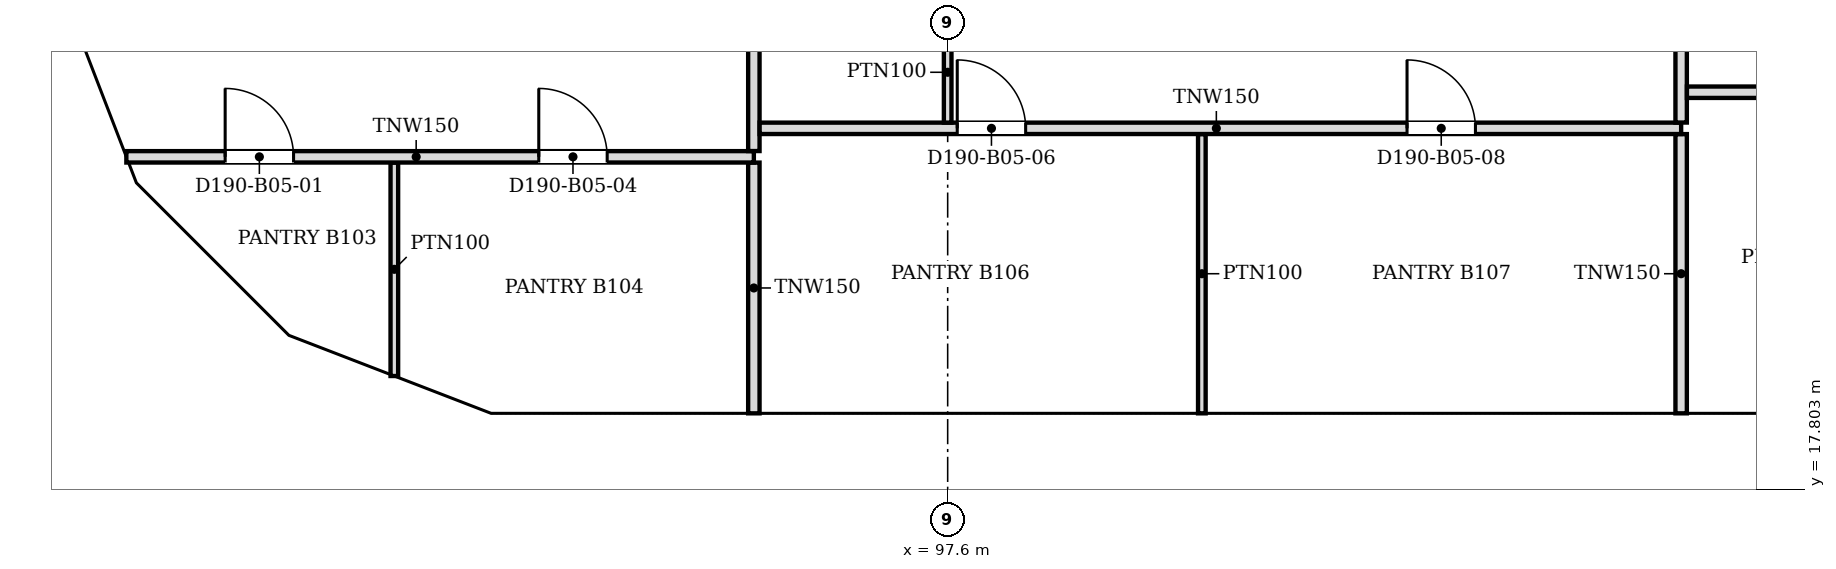
"""IFC4 building model, lengths in metres.
Left out: names, types, materials, properties, quantities, classifications, styles, units other than length and angle.
Written with IfcOpenShell. Run it as: python <this file> out.ifc"""

import sys

from ifc_helpers import new_model, si_unit, direction, frame, frame_2d, origin, place, context, subcontext, project, spatial, polyline, rectangle, outline, extrude, faceted_brep, source, transform, mapped, element, fill, save


model = new_model("IFC4")
c1 = context("Model", 3, precision=1e-05, world=origin(), true_north=direction((0.0, 1.0)))
c2 = subcontext(c1, "Body", "Model", "MODEL_VIEW")
j1 = project(units=[si_unit("LENGTHUNIT", "METRE"), si_unit("PLANEANGLEUNIT", "RADIAN")], contexts=[c1])
p1 = place(None, origin())
s1 = spatial("IfcSite", under=j1, at=p1, CompositionType="ELEMENT")
p2 = place(p1, origin())
s2 = spatial("IfcBuilding", under=s1, at=p2, CompositionType="ELEMENT")
p3 = place(p2, frame((0.0, 0.0, 52.4)))
s3 = spatial("IfcBuildingStorey", under=s2, at=p3, CompositionType="ELEMENT", Elevation=52.4)
m1 = source(origin(), c2, "Body", "Brep", [
    faceted_brep([(3.003, -0.25, 0.0), (6.053, -0.25, 3.8), (3.003, -0.25, 7.6), (0.0, -0.25, 3.8), (0.047, 0.25, 3.859), (3.003, 0.25, 7.6), (6.053, 0.25, 3.8), (3.003, 0.25, 0.0), (0.047, 0.25, 3.741), (0.0, 0.0, 3.8)], [[[0, 1, 2, 3]], [[4, 5, 6, 7, 8]], [[7, 6, 1, 0]], [[6, 5, 2, 1]], [[5, 4, 9, 3, 2]], [[8, 7, 0, 3, 9]], [[8, 9, 4]]]),
])
p4 = place(p3, frame((91.547, 18.55, -3.8), z_axis=(0.0, 0.0, 1.0), x_axis=(1.0, 0.0, 0.0)))
e1 = element("IfcWall", 1, at=p4, inside=s3, PredefinedType="SOLIDWALL", context=c2, shape_type="MappedRepresentation", body=[
    mapped(m1, transform((0.0, 0.0, 0.0), scale=1.0)),
])
m2 = source(origin(), c2, "Body", "SweptSolid", [
    extrude(outline(polyline([(3.005, 0.401), (5.733, 3.8), (3.005, 7.199), (0.319, 3.8), (3.005, 0.401)])), frame((0.0, 0.26, 0.0), z_axis=(0.0, -1.0, 0.0), x_axis=(1.0, 0.0, 0.0)), (0.0, 0.0, 1.0), 0.52),
])
p5 = place(p4, origin())
e2 = element("IfcOpeningElement", 2, at=p5, cuts=e1, PredefinedType="OPENING", context=c2, shape_type="MappedRepresentation", body=[
    mapped(m2, transform((0.0, 0.0, 0.0), scale=1.0)),
])
m3 = source(origin(), c2, "Body", "Brep", [
    faceted_brep([(3.05, -0.25, 0.0), (6.1, -0.25, 3.8), (6.1, -0.25, 3.8), (3.05, -0.25, 7.6), (0.0, -0.25, 3.8), (0.0, 0.25, 3.8), (3.05, 0.25, 7.6), (6.1, 0.25, 3.8), (6.1, 0.25, 3.8), (3.05, 0.25, 0.0)], [[[0, 1, 2, 3, 4]], [[5, 6, 7, 8, 9]], [[9, 8, 1, 0]], [[7, 6, 3, 2]], [[6, 5, 4, 3]], [[5, 9, 0, 4]], [[1, 8, 7, 2]]]),
])
p6 = place(p3, frame((97.6, 18.55, -3.8), z_axis=(0.0, 0.0, 1.0), x_axis=(1.0, 0.0, 0.0)))
e3 = element("IfcWall", 3, at=p6, inside=s3, PredefinedType="SOLIDWALL", context=c2, shape_type="MappedRepresentation", body=[
    mapped(m3, transform((0.0, 0.0, 0.0), scale=1.0)),
])
m4 = source(origin(), c2, "Body", "SweptSolid", [
    extrude(outline(polyline([(3.05, 0.399), (5.78, 3.8), (3.05, 7.2), (0.321, 3.8), (3.05, 0.399)])), frame((0.0, 0.26, 0.0), z_axis=(0.0, -1.0, 0.0), x_axis=(1.0, 0.0, 0.0)), (0.0, 0.0, 1.0), 0.52),
])
p7 = place(p6, origin())
e4 = element("IfcOpeningElement", 4, at=p7, cuts=e3, PredefinedType="OPENING", context=c2, shape_type="MappedRepresentation", body=[
    mapped(m4, transform((0.0, 0.0, 0.0), scale=1.0)),
])
m5 = source(origin(), c2, "Body", "SweptSolid", [
    extrude(outline(polyline([(3.05, 0.0), (6.1, 3.8), (3.05, 7.6), (0.0, 3.8), (3.05, 0.0)])), frame((0.0, 0.25, 0.0), z_axis=(0.0, -1.0, 0.0), x_axis=(1.0, 0.0, 0.0)), (0.0, 0.0, 1.0), 0.5),
])
p8 = place(p3, frame((103.7, 18.55, -3.8), z_axis=(0.0, 0.0, 1.0), x_axis=(1.0, 0.0, 0.0)))
e5 = element("IfcWall", 5, at=p8, inside=s3, PredefinedType="SOLIDWALL", context=c2, shape_type="MappedRepresentation", body=[
    mapped(m5, transform((0.0, 0.0, 0.0), scale=1.0)),
])
p9 = place(p8, origin())
e6 = element("IfcOpeningElement", 6, at=p9, cuts=e5, PredefinedType="OPENING", context=c2, shape_type="MappedRepresentation", body=[
    mapped(m4, transform((0.0, 0.0, 0.0), scale=1.0)),
])
m6 = source(origin(), c2, "Body", "Brep", [
    faceted_brep([(0.047, -0.25, 0.0), (2.997, -0.25, 3.8), (0.047, -0.25, 7.6), (0.0, -0.25, 7.541), (0.0, -0.25, 0.059), (0.093, 0.25, 7.54), (2.944, 0.25, 3.868), (2.944, 0.25, 3.732), (0.093, 0.25, 0.06), (2.997, 0.0, 3.8), (0.047, 0.0, 0.0), (0.047, 0.0, 7.6)], [[[0, 1, 2, 3, 4]], [[5, 6, 7, 8]], [[8, 7, 9, 1, 0, 10]], [[6, 5, 11, 2, 1, 9]], [[3, 2, 11]], [[10, 0, 4]], [[8, 10, 4, 3, 11, 5]], [[9, 7, 6]]]),
])
p10 = place(p3, frame((85.633, 24.49, -3.8), z_axis=(0.0, 0.0, 1.0), x_axis=(0.359901446078, -0.932990326376, 0.0)))
e7 = element("IfcWall", 7, at=p10, inside=s3, PredefinedType="SOLIDWALL", context=c2, shape_type="MappedRepresentation", body=[
    mapped(m6, transform((0.0, 0.0, 0.0), scale=1.0)),
])
m7 = source(origin(), c2, "Body", "SweptSolid", [
    extrude(outline(polyline([(0.247, 0.665), (2.681, 3.8), (0.247, 6.935), (0.247, 0.665)])), frame((0.0, 0.26, 0.0), z_axis=(0.0, -1.0, 0.0), x_axis=(1.0, 0.0, 0.0)), (0.0, 0.0, 1.0), 0.52),
])
p11 = place(p10, origin())
e8 = element("IfcOpeningElement", 8, at=p11, cuts=e7, PredefinedType="OPENING", context=c2, shape_type="MappedRepresentation", body=[
    mapped(m7, transform((0.0, 0.0, 0.0), scale=1.0)),
])
m8 = source(origin(), c2, "Body", "Brep", [
    faceted_brep([(2.944, -0.25, 0.0), (2.997, -0.25, 0.068), (2.997, -0.25, 7.532), (2.944, -0.25, 7.6), (0.0, -0.25, 3.8), (0.053, 0.25, 3.868), (2.891, 0.25, 7.532), (2.891, 0.25, 0.068), (0.053, 0.25, 3.731), (2.944, 0.0, 0.0), (2.944, 0.0, 7.6), (0.0, 0.0, 3.8)], [[[0, 1, 2, 3, 4]], [[5, 6, 7, 8]], [[1, 0, 9]], [[10, 3, 2]], [[6, 5, 11, 4, 3, 10]], [[8, 7, 9, 0, 4, 11]], [[8, 11, 5]], [[1, 9, 7, 6, 10, 2]]]),
])
p12 = place(p3, frame((86.712, 21.694, -3.8), z_axis=(0.0, 0.0, 1.0), x_axis=(0.707066050402, -0.707147509625, 0.0)))
e9 = element("IfcWall", 9, at=p12, inside=s3, PredefinedType="SOLIDWALL", context=c2, shape_type="MappedRepresentation", body=[
    mapped(m8, transform((0.0, 0.0, 0.0), scale=1.0)),
])
m9 = source(origin(), c2, "Body", "SweptSolid", [
    extrude(outline(polyline([(2.744, 6.934), (0.316, 3.8), (2.744, 0.666), (2.744, 6.934)])), frame((0.0, 0.26, 0.0), z_axis=(0.0, -1.0, 0.0), x_axis=(1.0, 0.0, 0.0)), (0.0, 0.0, 1.0), 0.52),
])
p13 = place(p12, origin())
e10 = element("IfcOpeningElement", 10, at=p13, cuts=e9, PredefinedType="OPENING", context=c2, shape_type="MappedRepresentation", body=[
    mapped(m9, transform((0.0, 0.0, 0.0), scale=1.0)),
])
m10 = source(origin(), c2, "Body", "Brep", [
    faceted_brep([(0.053, -0.25, 0.0), (3.003, -0.25, 3.8), (0.053, -0.25, 7.6), (0.0, -0.25, 7.531), (0.0, -0.25, 0.068), (0.106, 0.25, 7.532), (2.957, 0.25, 3.86), (2.957, 0.25, 3.74), (0.106, 0.25, 0.068), (3.003, 0.0, 3.8), (0.053, 0.0, 0.0), (0.053, 0.0, 7.6)], [[[0, 1, 2, 3, 4]], [[5, 6, 7, 8]], [[8, 7, 9, 1, 0, 10]], [[6, 5, 11, 2, 1, 9]], [[3, 2, 11]], [[10, 0, 4]], [[8, 10, 4, 3, 11, 5]], [[9, 7, 6]]]),
])
p14 = place(p3, frame((88.744, 19.631, -3.8), z_axis=(0.0, 0.0, 1.0), x_axis=(0.932997369089, -0.359883188373, 0.0)))
e11 = element("IfcWall", 11, at=p14, inside=s3, PredefinedType="SOLIDWALL", context=c2, shape_type="MappedRepresentation", body=[
    mapped(m10, transform((0.0, 0.0, 0.0), scale=1.0)),
])
m11 = source(origin(), c2, "Body", "SweptSolid", [
    extrude(outline(polyline([(0.253, 0.665), (2.687, 3.8), (0.253, 6.935), (0.253, 0.665)])), frame((0.0, 0.26, 0.0), z_axis=(0.0, -1.0, 0.0), x_axis=(1.0, 0.0, 0.0)), (0.0, 0.0, 1.0), 0.52),
])
p15 = place(p14, origin())
e12 = element("IfcOpeningElement", 12, at=p15, cuts=e11, PredefinedType="OPENING", context=c2, shape_type="MappedRepresentation", body=[
    mapped(m11, transform((0.0, 0.0, 0.0), scale=1.0)),
])
p16 = place(p2, frame((0.0, 0.0, 56.2)))
s4 = spatial("IfcBuildingStorey", under=s2, at=p16, CompositionType="ELEMENT", Elevation=56.2)
m12 = source(origin(), c2, "Body", "Brep", [
    faceted_brep([(0.047, -0.25, 0.0), (3.05, -0.25, 3.8), (0.047, -0.25, 7.6), (0.0, -0.25, 7.54), (0.0, -0.25, 0.06), (0.093, 0.25, 7.541), (3.05, 0.25, 3.8), (0.093, 0.25, 0.059), (0.047, 0.0, 0.0), (0.047, 0.0, 7.6)], [[[0, 1, 2, 3, 4]], [[5, 6, 7]], [[7, 6, 1, 0, 8]], [[6, 5, 9, 2, 1]], [[3, 2, 9]], [[8, 0, 4]], [[7, 8, 4, 3, 9, 5]]]),
])
p17 = place(p16, frame((91.5, 18.55, -3.8), z_axis=(0.0, 0.0, 1.0), x_axis=(1.0, 0.0, 0.0)))
e13 = element("IfcWall", 13, at=p17, inside=s4, PredefinedType="SOLIDWALL", context=c2, shape_type="MappedRepresentation", body=[
    mapped(m12, transform((0.0, 0.0, 0.0), scale=1.0)),
])
m13 = source(origin(), c2, "Body", "SweptSolid", [
    extrude(outline(polyline([(0.247, 0.656), (2.731, 3.8), (0.247, 6.944), (0.247, 0.656)])), frame((0.0, 0.26, 0.0), z_axis=(0.0, -1.0, 0.0), x_axis=(1.0, 0.0, 0.0)), (0.0, 0.0, 1.0), 0.52),
])
p18 = place(p17, origin())
e14 = element("IfcOpeningElement", 14, at=p18, cuts=e13, PredefinedType="OPENING", context=c2, shape_type="MappedRepresentation", body=[
    mapped(m13, transform((0.0, 0.0, 0.0), scale=1.0)),
])
m14 = source(origin(), c2, "Body", "Brep", [
    faceted_brep([(2.95, -0.25, 0.0), (2.997, -0.25, 0.059), (2.997, -0.25, 7.541), (2.95, -0.25, 7.6), (0.0, -0.25, 3.8), (0.053, 0.25, 3.868), (2.904, 0.25, 7.54), (2.904, 0.25, 0.06), (0.053, 0.25, 3.732), (2.95, 0.0, 0.0), (2.95, 0.0, 7.6), (0.0, 0.0, 3.8)], [[[0, 1, 2, 3, 4]], [[5, 6, 7, 8]], [[1, 0, 9]], [[10, 3, 2]], [[6, 5, 11, 4, 3, 10]], [[8, 7, 9, 0, 4, 11]], [[8, 11, 5]], [[1, 9, 7, 6, 10, 2]]]),
])
p19 = place(p16, frame((88.794, 19.612, -3.8), z_axis=(0.0, 0.0, 1.0), x_axis=(0.933000876937, -0.359874094142, 0.0)))
e15 = element("IfcWall", 15, at=p19, inside=s4, PredefinedType="SOLIDWALL", context=c2, shape_type="MappedRepresentation", body=[
    mapped(m14, transform((0.0, 0.0, 0.0), scale=1.0)),
])
m15 = source(origin(), c2, "Body", "SweptSolid", [
    extrude(outline(polyline([(2.75, 6.935), (0.316, 3.8), (2.75, 0.665), (2.75, 6.935)])), frame((0.0, 0.26, 0.0), z_axis=(0.0, -1.0, 0.0), x_axis=(1.0, 0.0, 0.0)), (0.0, 0.0, 1.0), 0.52),
])
p20 = place(p19, origin())
e16 = element("IfcOpeningElement", 16, at=p20, cuts=e15, PredefinedType="OPENING", context=c2, shape_type="MappedRepresentation", body=[
    mapped(m15, transform((0.0, 0.0, 0.0), scale=1.0)),
])
m16 = source(origin(), c2, "Body", "Brep", [
    faceted_brep([(3.05, -0.25, 0.0), (6.1, -0.25, 3.8), (6.1, -0.25, 3.8), (3.05, -0.25, 7.6), (0.0, -0.25, 3.8), (0.0, 0.25, 3.8), (3.05, 0.25, 7.6), (6.1, 0.25, 3.8), (6.1, 0.25, 3.8), (3.05, 0.25, 0.0)], [[[0, 1, 2, 3, 4]], [[5, 6, 7, 8, 9]], [[9, 8, 1, 0]], [[7, 6, 3, 2]], [[6, 5, 4, 3]], [[5, 9, 0, 4]], [[1, 8, 7, 2]]]),
])
p21 = place(p16, frame((94.55, 18.55, -3.8), z_axis=(0.0, 0.0, 1.0), x_axis=(1.0, 0.0, 0.0)))
e17 = element("IfcWall", 17, at=p21, inside=s4, PredefinedType="SOLIDWALL", context=c2, shape_type="MappedRepresentation", body=[
    mapped(m16, transform((0.0, 0.0, 0.0), scale=1.0)),
])
m17 = source(origin(), c2, "Body", "SweptSolid", [
    extrude(outline(polyline([(3.05, 0.399), (5.78, 3.8), (3.05, 7.201), (0.321, 3.8), (3.05, 0.399)])), frame((0.0, 0.26, 0.0), z_axis=(0.0, -1.0, 0.0), x_axis=(1.0, 0.0, 0.0)), (0.0, 0.0, 1.0), 0.52),
])
p22 = place(p21, origin())
e18 = element("IfcOpeningElement", 18, at=p22, cuts=e17, PredefinedType="OPENING", context=c2, shape_type="MappedRepresentation", body=[
    mapped(m17, transform((0.0, 0.0, 0.0), scale=1.0)),
])
m18 = source(origin(), c2, "Body", "SweptSolid", [
    extrude(outline(polyline([(3.05, 0.0), (6.1, 3.8), (3.05, 7.6), (0.0, 3.8), (3.05, 0.0)])), frame((0.0, 0.25, 0.0), z_axis=(0.0, -1.0, 0.0), x_axis=(1.0, 0.0, 0.0)), (0.0, 0.0, 1.0), 0.5),
])
p23 = place(p16, frame((100.65, 18.55, -3.8), z_axis=(0.0, 0.0, 1.0), x_axis=(1.0, 0.0, 0.0)))
e19 = element("IfcWall", 19, at=p23, inside=s4, PredefinedType="SOLIDWALL", context=c2, shape_type="MappedRepresentation", body=[
    mapped(m18, transform((0.0, 0.0, 0.0), scale=1.0)),
])
p24 = place(p23, origin())
e20 = element("IfcOpeningElement", 20, at=p24, cuts=e19, PredefinedType="OPENING", context=c2, shape_type="MappedRepresentation", body=[
    mapped(m17, transform((0.0, 0.0, 0.0), scale=1.0)),
])
p25 = place(p16, frame((106.75, 18.55, -3.8), z_axis=(0.0, 0.0, 1.0), x_axis=(1.0, 0.0, 0.0)))
e21 = element("IfcWall", 21, at=p25, inside=s4, PredefinedType="SOLIDWALL", context=c2, shape_type="MappedRepresentation", body=[
    mapped(m18, transform((0.0, 0.0, 0.0), scale=1.0)),
])
p26 = place(p25, origin())
e22 = element("IfcOpeningElement", 22, at=p26, cuts=e21, PredefinedType="OPENING", context=c2, shape_type="MappedRepresentation", body=[
    mapped(m17, transform((0.0, 0.0, 0.0), scale=1.0)),
])
m19 = source(origin(), c2, "Body", "Brep", [
    faceted_brep([(2.95, -0.25, 0.0), (3.003, -0.25, 0.068), (3.003, -0.25, 7.532), (2.95, -0.25, 7.6), (0.0, -0.25, 3.8), (0.047, 0.25, 3.86), (2.898, 0.25, 7.532), (2.898, 0.25, 0.068), (0.047, 0.25, 3.74), (2.95, 0.0, 0.0), (2.95, 0.0, 7.6), (0.0, 0.0, 3.8)], [[[0, 1, 2, 3, 4]], [[5, 6, 7, 8]], [[1, 0, 9]], [[10, 3, 2]], [[6, 5, 11, 4, 3, 10]], [[8, 7, 9, 0, 4, 11]], [[8, 11, 5]], [[1, 9, 7, 6, 10, 2]]]),
])
p27 = place(p16, frame((85.65, 24.447, -3.8), z_axis=(0.0, 0.0, 1.0), x_axis=(0.35992665181, -0.932980602862, 0.0)))
e23 = element("IfcWall", 23, at=p27, inside=s4, PredefinedType="SOLIDWALL", context=c2, shape_type="MappedRepresentation", body=[
    mapped(m19, transform((0.0, 0.0, 0.0), scale=1.0)),
])
p28 = place(p27, origin())
e24 = element("IfcOpeningElement", 24, at=p28, cuts=e23, PredefinedType="OPENING", context=c2, shape_type="MappedRepresentation", body=[
    mapped(m15, transform((0.0, 0.0, 0.0), scale=1.0)),
])
m20 = source(origin(), c2, "Body", "Brep", [
    faceted_brep([(0.053, -0.25, 0.0), (2.997, -0.25, 3.8), (0.053, -0.25, 7.6), (0.0, -0.25, 7.532), (0.0, -0.25, 0.068), (0.106, 0.25, 7.532), (2.944, 0.25, 3.868), (2.944, 0.25, 3.732), (0.106, 0.25, 0.068), (2.997, 0.0, 3.8), (0.053, 0.0, 0.0), (0.053, 0.0, 7.6)], [[[0, 1, 2, 3, 4]], [[5, 6, 7, 8]], [[8, 7, 9, 1, 0, 10]], [[6, 5, 11, 2, 1, 9]], [[3, 2, 11]], [[10, 0, 4]], [[8, 10, 4, 3, 11, 5]], [[9, 7, 6]]]),
])
p29 = place(p16, frame((86.675, 21.731, -3.8), z_axis=(0.0, 0.0, 1.0), x_axis=(0.707106781187, -0.707106781187, 0.0)))
e25 = element("IfcWall", 25, at=p29, inside=s4, PredefinedType="SOLIDWALL", context=c2, shape_type="MappedRepresentation", body=[
    mapped(m20, transform((0.0, 0.0, 0.0), scale=1.0)),
])
m21 = source(origin(), c2, "Body", "SweptSolid", [
    extrude(outline(polyline([(0.253, 0.667), (2.681, 3.8), (0.253, 6.934), (0.253, 0.667)])), frame((0.0, 0.26, 0.0), z_axis=(0.0, -1.0, 0.0), x_axis=(1.0, 0.0, 0.0)), (0.0, 0.0, 1.0), 0.52),
])
p30 = place(p29, origin())
e26 = element("IfcOpeningElement", 26, at=p30, cuts=e25, PredefinedType="OPENING", context=c2, shape_type="MappedRepresentation", body=[
    mapped(m21, transform((0.0, 0.0, 0.0), scale=1.0)),
])
p31 = place(p3, frame((95.05, 18.8, 0.0), z_axis=(0.0, 0.0, 1.0), x_axis=(0.0, 1.0, 0.0)))
e27 = element("IfcWall", 27, at=p31, inside=s3, PredefinedType="PARTITIONING", context=c2, shape_type="SweptSolid", body=[
    extrude(rectangle(XDim=3.299, YDim=0.15, at=frame_2d((1.649, 0.0))), origin(), (0.0, 0.0, 1.0), 3.067),
])
p32 = place(p3, frame((100.944, 18.8, 0.0), z_axis=(0.0, 0.0, 1.0), x_axis=(0.0, 1.0, 0.0)))
e28 = element("IfcWall", 28, at=p32, inside=s3, PredefinedType="PARTITIONING", context=c2, shape_type="SweptSolid", body=[
    extrude(rectangle(XDim=3.674, YDim=0.1, at=frame_2d((1.837, 0.0))), origin(), (0.0, 0.0, 1.0), 3.067),
])
p33 = place(p3, frame((107.25, 18.8, 0.0), z_axis=(0.0, 0.0, 1.0), x_axis=(0.0, 1.0, 0.0)))
e29 = element("IfcWall", 29, at=p33, inside=s3, PredefinedType="PARTITIONING", context=c2, shape_type="SweptSolid", body=[
    extrude(rectangle(XDim=3.674, YDim=0.15, at=frame_2d((1.837, 0.0))), origin(), (0.0, 0.0, 1.0), 3.067),
])
p34 = place(p3, frame((90.32, 19.291, 0.0), z_axis=(0.0, 0.0, 1.0), x_axis=(0.0, 1.0, 0.0)))
e30 = element("IfcWall", 30, at=p34, inside=s3, PredefinedType="PARTITIONING", context=c2, shape_type="SweptSolid", body=[
    extrude(rectangle(XDim=2.808, YDim=0.1, at=frame_2d((1.404, 0.0))), origin(), (0.0, 0.0, 1.0), 3.067),
])
p35 = place(p3, frame((95.05, 22.175, 0.0), z_axis=(0.0, 0.0, 1.0), x_axis=(-1.0, 0.0, 0.0)))
e31 = element("IfcWall", 31, at=p35, inside=s3, PredefinedType="PARTITIONING", context=c2, shape_type="SweptSolid", body=[
    extrude(rectangle(XDim=8.256, YDim=0.15, at=frame_2d((4.128, 0.0))), origin(), (0.0, 0.0, 1.0), 3.067),
])
m22 = source(origin(), c2, "Body", "SweptSolid", [
    extrude(rectangle(XDim=0.9, YDim=2.1, at=frame_2d((0.45, 1.05))), frame((0.0, 0.085, 0.0), z_axis=(0.0, -1.0, 0.0), x_axis=(1.0, 0.0, 0.0)), (0.0, 0.0, 1.0), 0.17),
])
p36 = place(p35, frame((6.056, 0.0, 0.0)))
e32 = element("IfcOpeningElement", 32, at=p36, cuts=e31, PredefinedType="OPENING", context=c2, shape_type="MappedRepresentation", body=[
    mapped(m22, transform((0.0, 0.0, 0.0), scale=1.0)),
])
p37 = place(p35, frame((1.93, 0.0, 0.0)))
e33 = element("IfcOpeningElement", 33, at=p37, cuts=e31, PredefinedType="OPENING", context=c2, shape_type="MappedRepresentation", body=[
    mapped(m22, transform((0.0, 0.0, 0.0), scale=1.0)),
])
p38 = place(p3, frame((95.05, 22.251, 0.0), z_axis=(0.0, 0.0, 1.0), x_axis=(0.0, 1.0, 0.0)))
e34 = element("IfcWall", 34, at=p38, inside=s3, PredefinedType="PARTITIONING", context=c2, shape_type="SweptSolid", body=[
    extrude(rectangle(XDim=12.273, YDim=0.15, at=frame_2d((6.136, 0.0))), origin(), (0.0, 0.0, 1.0), 3.067),
])
p39 = place(p3, frame((107.25, 22.55, 0.0), z_axis=(0.0, 0.0, 1.0), x_axis=(-1.0, 0.0, 0.0)))
e35 = element("IfcWall", 35, at=p39, inside=s3, PredefinedType="PARTITIONING", context=c2, shape_type="SweptSolid", body=[
    extrude(rectangle(XDim=12.124, YDim=0.15, at=frame_2d((6.062, 0.0))), origin(), (0.0, 0.0, 1.0), 3.067),
])
p40 = place(p39, frame((8.624, 0.0, 0.0)))
e36 = element("IfcOpeningElement", 36, at=p40, cuts=e35, PredefinedType="OPENING", context=c2, shape_type="MappedRepresentation", body=[
    mapped(m22, transform((0.0, 0.0, 0.0), scale=1.0)),
])
p41 = place(p39, frame((2.706, 0.0, 0.0)))
e37 = element("IfcOpeningElement", 37, at=p41, cuts=e35, PredefinedType="OPENING", context=c2, shape_type="MappedRepresentation", body=[
    mapped(m22, transform((0.0, 0.0, 0.0), scale=1.0)),
])
p42 = place(p3, frame((107.25, 22.626, 0.0), z_axis=(0.0, 0.0, 1.0), x_axis=(0.0, 1.0, 0.0)))
e38 = element("IfcWall", 38, at=p42, inside=s3, PredefinedType="PARTITIONING", context=c2, shape_type="SweptSolid", body=[
    extrude(rectangle(XDim=11.898, YDim=0.15, at=frame_2d((5.949, 0.0))), origin(), (0.0, 0.0, 1.0), 3.067),
])
p43 = place(p3, frame((116.4, 23.025, 0.0), z_axis=(0.0, 0.0, 1.0), x_axis=(-1.0, 0.0, 0.0)))
e39 = element("IfcWall", 39, at=p43, inside=s3, PredefinedType="PARTITIONING", context=c2, shape_type="SweptSolid", body=[
    extrude(rectangle(XDim=9.074, YDim=0.15, at=frame_2d((4.537, 0.0))), origin(), (0.0, 0.0, 1.0), 3.067),
])
p44 = place(p43, frame((7.074, 0.0, 0.0)))
e40 = element("IfcOpeningElement", 40, at=p44, cuts=e39, PredefinedType="OPENING", context=c2, shape_type="MappedRepresentation", body=[
    mapped(m22, transform((0.0, 0.0, 0.0), scale=1.0)),
])
p45 = place(p43, frame((1.93, 0.0, 0.0)))
e41 = element("IfcOpeningElement", 41, at=p45, cuts=e39, PredefinedType="OPENING", context=c2, shape_type="MappedRepresentation", body=[
    mapped(m22, transform((0.0, 0.0, 0.0), scale=1.0)),
])
p46 = place(p3, frame((97.6, 23.95, 0.0), z_axis=(0.0, 0.0, 1.0), x_axis=(0.0, -1.0, 0.0)))
e42 = element("IfcWall", 42, at=p46, inside=s3, PredefinedType="PARTITIONING", context=c2, shape_type="SweptSolid", body=[
    extrude(rectangle(XDim=1.325, YDim=0.1, at=frame_2d((0.663, 0.0))), origin(), (0.0, 0.0, 1.0), 3.067),
])
m23 = source(origin(), c2, "Body", "SweptSolid", [
    extrude(rectangle(XDim=0.9, YDim=2.1, at=frame_2d((0.45, 1.05))), frame((0.0, 0.025, 0.0), z_axis=(0.0, -1.0, 0.0), x_axis=(1.0, 0.0, 0.0)), (0.0, 0.0, 1.0), 0.05),
])
p47 = place(p36, origin())
e43 = element("IfcDoor", 43, at=p47, inside=s3, OperationType="SINGLE_SWING_RIGHT", PredefinedType="DOOR", context=c2, shape_type="MappedRepresentation", body=[
    mapped(m23, transform((0.0, 0.0, 0.0), scale=1.0)),
])
fill(e32, e43)
p48 = place(p37, origin())
e44 = element("IfcDoor", 44, at=p48, inside=s3, OperationType="SINGLE_SWING_RIGHT", PredefinedType="DOOR", context=c2, shape_type="MappedRepresentation", body=[
    mapped(m23, transform((0.0, 0.0, 0.0), scale=1.0)),
])
fill(e33, e44)
p49 = place(p40, origin())
e45 = element("IfcDoor", 45, at=p49, inside=s3, OperationType="SINGLE_SWING_RIGHT", PredefinedType="DOOR", context=c2, shape_type="MappedRepresentation", body=[
    mapped(m23, transform((0.0, 0.0, 0.0), scale=1.0)),
])
fill(e36, e45)
p50 = place(p41, origin())
e46 = element("IfcDoor", 46, at=p50, inside=s3, OperationType="SINGLE_SWING_RIGHT", PredefinedType="DOOR", context=c2, shape_type="MappedRepresentation", body=[
    mapped(m23, transform((0.0, 0.0, 0.0), scale=1.0)),
])
fill(e37, e46)
save(model, sys.argv[1])
